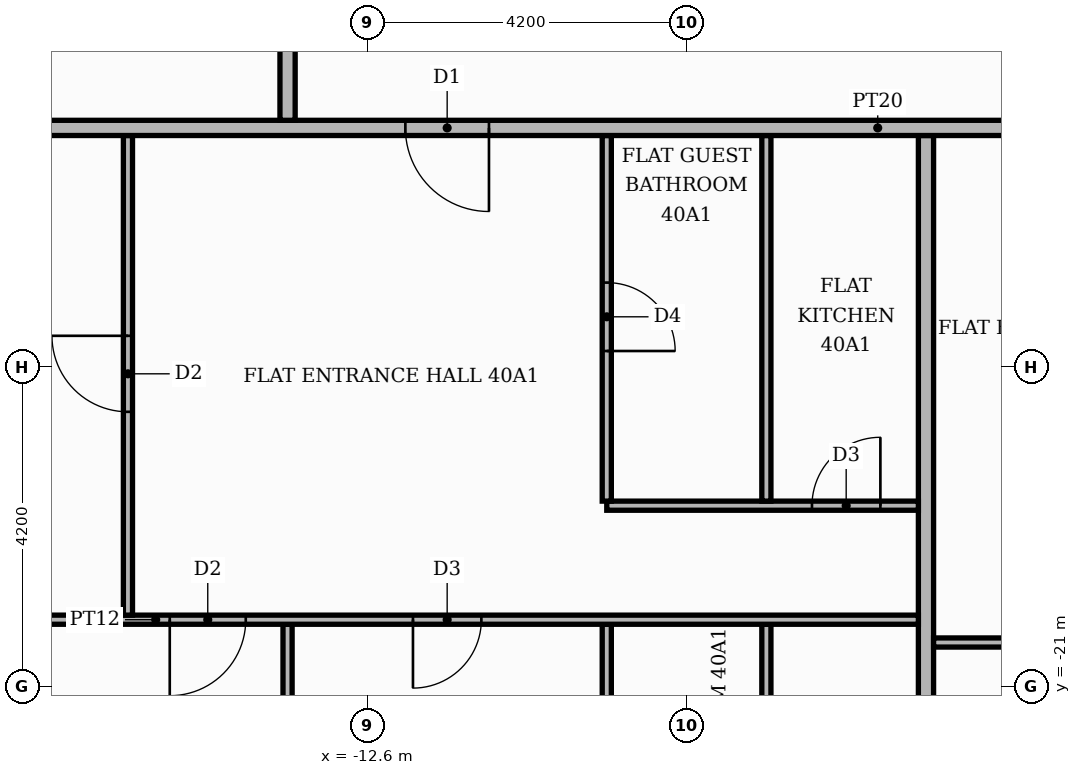
"""IFC4 building model, lengths in metres.
Left out: names, types, materials, properties, quantities, classifications, styles, units other than length and angle.
Written with IfcOpenShell. Run it as: python <this file> out.ifc"""

import sys

from ifc_helpers import new_model, si_unit, direction, frame, frame_2d, origin, place, context, subcontext, project, spatial, rectangle, extrude, element, fill, save


model = new_model("IFC4")
c1 = context("Model", 3, precision=1e-05, world=origin(), true_north=direction((0.0, 1.0)))
c2 = subcontext(c1, "Body", "Model", "MODEL_VIEW")
j1 = project(units=[si_unit("LENGTHUNIT", "METRE"), si_unit("PLANEANGLEUNIT", "RADIAN")], contexts=[c1])
p1 = place(None, origin())
s1 = spatial("IfcSite", under=j1, at=p1, CompositionType="ELEMENT")
p2 = place(p1, origin())
s2 = spatial("IfcBuilding", under=s1, at=p2, CompositionType="ELEMENT")
p3 = place(p2, frame((0.0, 0.0, 168.9)))
s3 = spatial("IfcBuildingStorey", under=s2, at=p3, CompositionType="ELEMENT", Elevation=168.9)
p4 = place(p3, frame((-13.65, -25.42, 0.0), z_axis=(0.0, 0.0, 1.0), x_axis=(0.0, 1.0, 0.0)))
e1 = element("IfcWall", 1, at=p4, inside=s3, PredefinedType="PARTITIONING", context=c2, shape_type="SweptSolid", body=[
    extrude(rectangle(XDim=5.24, YDim=0.12, at=frame_2d((2.62, 0.0))), origin(), (0.0, 0.0, 1.0), 3.48),
])
p5 = place(p3, frame((-9.45, -25.42, 0.0), z_axis=(0.0, 0.0, 1.0), x_axis=(0.0, 1.0, 0.0)))
e2 = element("IfcWall", 2, at=p5, inside=s3, PredefinedType="PARTITIONING", context=c2, shape_type="SweptSolid", body=[
    extrude(rectangle(XDim=5.24, YDim=0.12, at=frame_2d((2.62, 0.0))), origin(), (0.0, 0.0, 1.0), 3.48),
])
p6 = place(p5, frame((2.05, 0.0, 0.0)))
e3 = element("IfcOpeningElement", 3, at=p6, cuts=e2, PredefinedType="OPENING", context=c2, shape_type="SweptSolid", body=[
    extrude(rectangle(XDim=0.9, YDim=2.1, at=frame_2d((0.45, 1.05))), frame((0.0, 0.07, 0.0), z_axis=(0.0, -1.0, 0.0), x_axis=(1.0, 0.0, 0.0)), (0.0, 0.0, 1.0), 0.14),
])
p7 = place(p3, frame((-7.35, -25.42, 0.0), z_axis=(0.0, 0.0, 1.0), x_axis=(0.0, 1.0, 0.0)))
e4 = element("IfcWall", 4, at=p7, inside=s3, PredefinedType="PARTITIONING", context=c2, shape_type="SweptSolid", body=[
    extrude(rectangle(XDim=5.24, YDim=0.12, at=frame_2d((2.62, 0.0))), origin(), (0.0, 0.0, 1.0), 3.48),
])
p8 = place(p7, frame((2.05, 0.0, 0.0)))
e5 = element("IfcOpeningElement", 5, at=p8, cuts=e4, PredefinedType="OPENING", context=c2, shape_type="SweptSolid", body=[
    extrude(rectangle(XDim=0.9, YDim=2.1, at=frame_2d((0.45, 1.05))), frame((0.0, 0.07, 0.0), z_axis=(0.0, -1.0, 0.0), x_axis=(1.0, 0.0, 0.0)), (0.0, 0.0, 1.0), 0.14),
])
p9 = place(p3, frame((-5.25, -25.42, 0.0), z_axis=(0.0, 0.0, 1.0), x_axis=(0.0, 1.0, 0.0)))
e6 = element("IfcWall", 6, at=p9, inside=s3, PredefinedType="PARTITIONING", context=c2, shape_type="SweptSolid", body=[
    extrude(rectangle(XDim=11.67, YDim=0.2, at=frame_2d((5.835, 0.0))), origin(), (0.0, 0.0, 1.0), 3.48),
])
p10 = place(p3, frame((-5.15, -20.42, 0.0), z_axis=(0.0, 0.0, 1.0), x_axis=(1.0, 0.0, 0.0)))
e7 = element("IfcWall", 7, at=p10, inside=s3, PredefinedType="PARTITIONING", context=c2, shape_type="SweptSolid", body=[
    extrude(rectangle(XDim=18.7, YDim=0.12, at=frame_2d((9.35, 0.0))), origin(), (0.0, 0.0, 1.0), 3.48),
])
p11 = place(p10, frame((1.5, 0.0, 0.0)))
e8 = element("IfcOpeningElement", 8, at=p11, cuts=e7, PredefinedType="OPENING", context=c2, shape_type="SweptSolid", body=[
    extrude(rectangle(XDim=1.0, YDim=2.1, at=frame_2d((0.5, 1.05))), frame((0.0, 0.07, 0.0), z_axis=(0.0, -1.0, 0.0), x_axis=(1.0, 0.0, 0.0)), (0.0, 0.0, 1.0), 0.14),
])
p12 = place(p10, frame((5.75, 0.0, 0.0)))
e9 = element("IfcOpeningElement", 9, at=p12, cuts=e7, PredefinedType="OPENING", context=c2, shape_type="SweptSolid", body=[
    extrude(rectangle(XDim=0.9, YDim=2.1, at=frame_2d((0.45, 1.05))), frame((0.0, 0.07, 0.0), z_axis=(0.0, -1.0, 0.0), x_axis=(1.0, 0.0, 0.0)), (0.0, 0.0, 1.0), 0.14),
])
p13 = place(p10, frame((14.15, 0.0, 0.0)))
e10 = element("IfcOpeningElement", 10, at=p13, cuts=e7, PredefinedType="OPENING", context=c2, shape_type="SweptSolid", body=[
    extrude(rectangle(XDim=0.9, YDim=2.1, at=frame_2d((0.45, 1.05))), frame((0.0, 0.07, 0.0), z_axis=(0.0, -1.0, 0.0), x_axis=(1.0, 0.0, 0.0)), (0.0, 0.0, 1.0), 0.14),
])
p14 = place(p3, frame((-25.42, -20.12, 0.0), z_axis=(0.0, 0.0, 1.0), x_axis=(1.0, 0.0, 0.0)))
e11 = element("IfcWall", 11, at=p14, inside=s3, PredefinedType="PARTITIONING", context=c2, shape_type="SweptSolid", body=[
    extrude(rectangle(XDim=20.07, YDim=0.12, at=frame_2d((10.035, 0.0))), origin(), (0.0, 0.0, 1.0), 3.48),
])
p15 = place(p14, frame((10.22, 0.0, 0.0)))
e12 = element("IfcOpeningElement", 12, at=p15, cuts=e11, PredefinedType="OPENING", context=c2, shape_type="SweptSolid", body=[
    extrude(rectangle(XDim=1.0, YDim=2.1, at=frame_2d((0.5, 1.05))), frame((0.0, 0.07, 0.0), z_axis=(0.0, -1.0, 0.0), x_axis=(1.0, 0.0, 0.0)), (0.0, 0.0, 1.0), 0.14),
])
p16 = place(p14, frame((13.42, 0.0, 0.0)))
e13 = element("IfcOpeningElement", 13, at=p16, cuts=e11, PredefinedType="OPENING", context=c2, shape_type="SweptSolid", body=[
    extrude(rectangle(XDim=0.9, YDim=2.1, at=frame_2d((0.45, 1.05))), frame((0.0, 0.07, 0.0), z_axis=(0.0, -1.0, 0.0), x_axis=(1.0, 0.0, 0.0)), (0.0, 0.0, 1.0), 0.14),
])
p17 = place(p3, frame((-15.75, -20.06, 0.0), z_axis=(0.0, 0.0, 1.0), x_axis=(0.0, 1.0, 0.0)))
e14 = element("IfcWall", 14, at=p17, inside=s3, PredefinedType="PARTITIONING", context=c2, shape_type="SweptSolid", body=[
    extrude(rectangle(XDim=6.31, YDim=0.12, at=frame_2d((3.155, 0.0))), origin(), (0.0, 0.0, 1.0), 3.48),
])
p18 = place(p17, frame((2.675, 0.0, 0.0)))
e15 = element("IfcOpeningElement", 15, at=p18, cuts=e14, PredefinedType="OPENING", context=c2, shape_type="SweptSolid", body=[
    extrude(rectangle(XDim=1.0, YDim=2.1, at=frame_2d((0.5, 1.05))), frame((0.0, 0.07, 0.0), z_axis=(0.0, -1.0, 0.0), x_axis=(1.0, 0.0, 0.0)), (0.0, 0.0, 1.0), 0.14),
])
p19 = place(p3, frame((-9.45, -18.62, 0.0), z_axis=(0.0, 0.0, 1.0), x_axis=(1.0, 0.0, 0.0)))
e16 = element("IfcWall", 16, at=p19, inside=s3, PredefinedType="PARTITIONING", context=c2, shape_type="SweptSolid", body=[
    extrude(rectangle(XDim=4.1, YDim=0.12, at=frame_2d((2.05, 0.0))), origin(), (0.0, 0.0, 1.0), 3.48),
])
p20 = place(p19, frame((2.7, 0.0, 0.0)))
e17 = element("IfcOpeningElement", 17, at=p20, cuts=e16, PredefinedType="OPENING", context=c2, shape_type="SweptSolid", body=[
    extrude(rectangle(XDim=0.9, YDim=2.1, at=frame_2d((0.45, 1.05))), frame((0.0, 0.07, 0.0), z_axis=(0.0, -1.0, 0.0), x_axis=(1.0, 0.0, 0.0)), (0.0, 0.0, 1.0), 0.14),
])
p21 = place(p3, frame((-9.45, -18.56, 0.0), z_axis=(0.0, 0.0, 1.0), x_axis=(0.0, 1.0, 0.0)))
e18 = element("IfcWall", 18, at=p21, inside=s3, PredefinedType="PARTITIONING", context=c2, shape_type="SweptSolid", body=[
    extrude(rectangle(XDim=4.81, YDim=0.12, at=frame_2d((2.405, 0.0))), origin(), (0.0, 0.0, 1.0), 3.48),
])
p22 = place(p21, frame((1.975, 0.0, 0.0)))
e19 = element("IfcOpeningElement", 19, at=p22, cuts=e18, PredefinedType="OPENING", context=c2, shape_type="SweptSolid", body=[
    extrude(rectangle(XDim=0.9, YDim=2.1, at=frame_2d((0.45, 1.05))), frame((0.0, 0.07, 0.0), z_axis=(0.0, -1.0, 0.0), x_axis=(1.0, 0.0, 0.0)), (0.0, 0.0, 1.0), 0.14),
])
p23 = place(p3, frame((-7.35, -18.56, 0.0), z_axis=(0.0, 0.0, 1.0), x_axis=(0.0, 1.0, 0.0)))
e20 = element("IfcWall", 20, at=p23, inside=s3, PredefinedType="PARTITIONING", context=c2, shape_type="SweptSolid", body=[
    extrude(rectangle(XDim=4.81, YDim=0.12, at=frame_2d((2.405, 0.0))), origin(), (0.0, 0.0, 1.0), 3.48),
])
p24 = place(p3, frame((-25.42, -13.65, 0.0), z_axis=(0.0, 0.0, 1.0), x_axis=(1.0, 0.0, 0.0)))
e21 = element("IfcWall", 21, at=p24, inside=s3, PredefinedType="PARTITIONING", context=c2, shape_type="SweptSolid", body=[
    extrude(rectangle(XDim=39.07, YDim=0.2, at=frame_2d((19.535, 0.0))), origin(), (0.0, 0.0, 1.0), 3.48),
])
p25 = place(p24, frame((13.32, 0.0, 0.0)))
e22 = element("IfcOpeningElement", 22, at=p25, cuts=e21, PredefinedType="OPENING", context=c2, shape_type="SweptSolid", body=[
    extrude(rectangle(XDim=1.1, YDim=2.4, at=frame_2d((0.55, 1.2))), frame((0.0, 0.11, 0.0), z_axis=(0.0, -1.0, 0.0), x_axis=(1.0, 0.0, 0.0)), (0.0, 0.0, 1.0), 0.22),
])
p26 = place(p24, frame((21.72, 0.0, 0.0)))
e23 = element("IfcOpeningElement", 23, at=p26, cuts=e21, PredefinedType="OPENING", context=c2, shape_type="SweptSolid", body=[
    extrude(rectangle(XDim=1.1, YDim=2.4, at=frame_2d((0.55, 1.2))), frame((0.0, 0.11, 0.0), z_axis=(0.0, -1.0, 0.0), x_axis=(1.0, 0.0, 0.0)), (0.0, 0.0, 1.0), 0.22),
])
p27 = place(p3, frame((-13.65, -13.55, 0.0), z_axis=(0.0, 0.0, 1.0), x_axis=(0.0, 1.0, 0.0)))
e24 = element("IfcWall", 24, at=p27, inside=s3, PredefinedType="PARTITIONING", context=c2, shape_type="SweptSolid", body=[
    extrude(rectangle(XDim=2.45, YDim=0.2, at=frame_2d((1.225, 0.0))), origin(), (0.0, 0.0, 1.0), 3.48),
])
p28 = place(p25, frame((1.1, 0.0, 0.0), z_axis=(0.0, 0.0, 1.0), x_axis=(-1.0, 0.0, 0.0)))
e25 = element("IfcDoor", 25, at=p28, inside=s3, OperationType="SINGLE_SWING_RIGHT", PredefinedType="DOOR", context=c2, shape_type="SweptSolid", body=[
    extrude(rectangle(XDim=1.1, YDim=2.4, at=frame_2d((0.55, 1.2))), frame((0.0, 0.025, 0.0), z_axis=(0.0, -1.0, 0.0), x_axis=(1.0, 0.0, 0.0)), (0.0, 0.0, 1.0), 0.05),
])
fill(e22, e25)
p29 = place(p18, origin())
e26 = element("IfcDoor", 26, at=p29, inside=s3, OperationType="SINGLE_SWING_RIGHT", PredefinedType="DOOR", context=c2, shape_type="SweptSolid", body=[
    extrude(rectangle(XDim=1.0, YDim=2.1, at=frame_2d((0.5, 1.05))), frame((0.0, 0.025, 0.0), z_axis=(0.0, -1.0, 0.0), x_axis=(1.0, 0.0, 0.0)), (0.0, 0.0, 1.0), 0.05),
])
fill(e15, e26)
p30 = place(p22, frame((0.9, 0.0, 0.0), z_axis=(0.0, 0.0, 1.0), x_axis=(-1.0, 0.0, 0.0)))
e27 = element("IfcDoor", 27, at=p30, inside=s3, OperationType="SINGLE_SWING_LEFT", PredefinedType="DOOR", context=c2, shape_type="SweptSolid", body=[
    extrude(rectangle(XDim=0.9, YDim=2.1, at=frame_2d((0.45, 1.05))), frame((0.0, 0.025, 0.0), z_axis=(0.0, -1.0, 0.0), x_axis=(1.0, 0.0, 0.0)), (0.0, 0.0, 1.0), 0.05),
])
fill(e19, e27)
p31 = place(p20, origin())
e28 = element("IfcDoor", 28, at=p31, inside=s3, OperationType="SINGLE_SWING_RIGHT", PredefinedType="DOOR", context=c2, shape_type="SweptSolid", body=[
    extrude(rectangle(XDim=0.9, YDim=2.1, at=frame_2d((0.45, 1.05))), frame((0.0, 0.025, 0.0), z_axis=(0.0, -1.0, 0.0), x_axis=(1.0, 0.0, 0.0)), (0.0, 0.0, 1.0), 0.05),
])
fill(e17, e28)
p32 = place(p15, frame((1.0, 0.0, 0.0), z_axis=(0.0, 0.0, 1.0), x_axis=(-1.0, 0.0, 0.0)))
e29 = element("IfcDoor", 29, at=p32, inside=s3, OperationType="SINGLE_SWING_LEFT", PredefinedType="DOOR", context=c2, shape_type="SweptSolid", body=[
    extrude(rectangle(XDim=1.0, YDim=2.1, at=frame_2d((0.5, 1.05))), frame((0.0, 0.025, 0.0), z_axis=(0.0, -1.0, 0.0), x_axis=(1.0, 0.0, 0.0)), (0.0, 0.0, 1.0), 0.05),
])
fill(e12, e29)
p33 = place(p16, frame((0.9, 0.0, 0.0), z_axis=(0.0, 0.0, 1.0), x_axis=(-1.0, 0.0, 0.0)))
e30 = element("IfcDoor", 30, at=p33, inside=s3, OperationType="SINGLE_SWING_LEFT", PredefinedType="DOOR", context=c2, shape_type="SweptSolid", body=[
    extrude(rectangle(XDim=0.9, YDim=2.1, at=frame_2d((0.45, 1.05))), frame((0.0, 0.025, 0.0), z_axis=(0.0, -1.0, 0.0), x_axis=(1.0, 0.0, 0.0)), (0.0, 0.0, 1.0), 0.05),
])
fill(e13, e30)
save(model, sys.argv[1])
